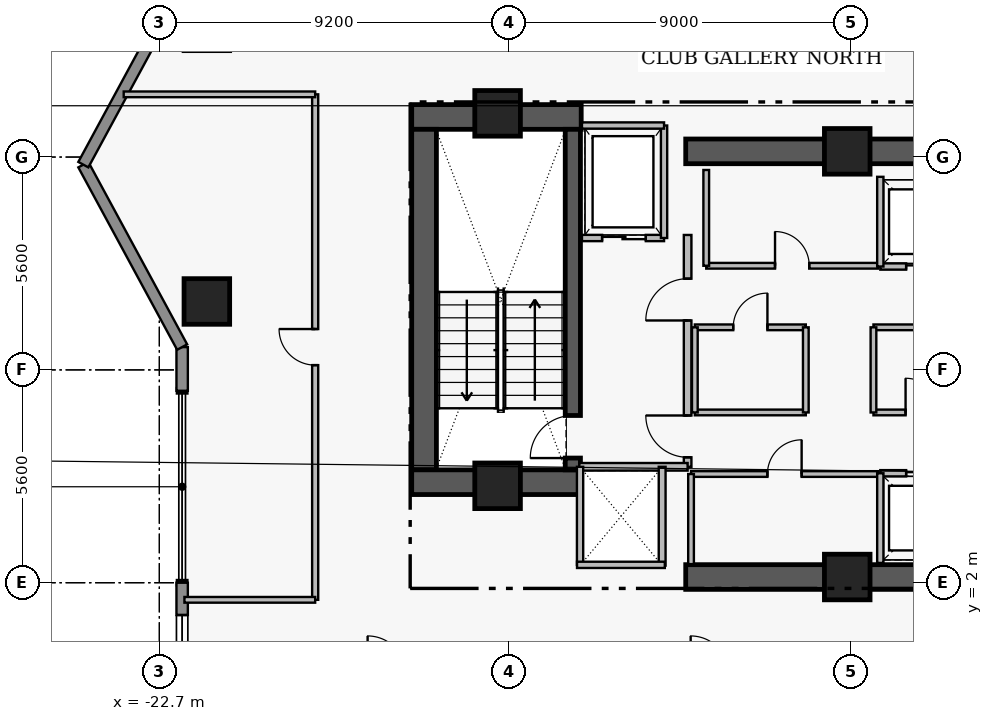
"""IFC4 building model, lengths in metres.
Left out: names, types, materials, properties, quantities, classifications, styles, units other than length and angle.
Written with IfcOpenShell. Run it as: python <this file> out.ifc"""

import sys

from ifc_helpers import new_model, si_unit, direction, frame, frame_2d, origin, origin_2d, place, context, subcontext, project, spatial, rectangle, extrude, element, fill, save


model = new_model("IFC4")
c1 = context("Model", 3, precision=1e-05, world=origin(), true_north=direction((0.0, 1.0)))
c2 = subcontext(c1, "Body", "Model", "MODEL_VIEW")
j1 = project(units=[si_unit("LENGTHUNIT", "METRE"), si_unit("PLANEANGLEUNIT", "RADIAN")], contexts=[c1])
p1 = place(None, origin())
s1 = spatial("IfcSite", under=j1, at=p1, CompositionType="ELEMENT")
p2 = place(p1, origin())
s2 = spatial("IfcBuilding", under=s1, at=p2, CompositionType="ELEMENT")
p3 = place(p2, frame((0.0, 0.0, 181.15)))
s3 = spatial("IfcBuildingStorey", under=s2, at=p3, CompositionType="ELEMENT", Elevation=181.15)
p4 = place(p3, frame((-16.06, 14.255, 0.0), z_axis=(0.0, 0.0, 1.0), x_axis=(1.0, 0.0, 0.0)))
e1 = element("IfcWall", 1, at=p4, inside=s3, PredefinedType="SHEAR", context=c2, shape_type="SweptSolid", body=[
    extrude(rectangle(XDim=4.46, YDim=0.65, at=frame_2d((2.23, 0.0))), origin(), (0.0, 0.0, 1.0), 3.56),
])
p5 = place(p3, frame((-15.735, 4.97, 0.0), z_axis=(0.0, 0.0, 1.0), x_axis=(0.0, 1.0, 0.0)))
e2 = element("IfcWall", 2, at=p5, inside=s3, PredefinedType="SHEAR", context=c2, shape_type="SweptSolid", body=[
    extrude(rectangle(XDim=8.96, YDim=0.65, at=frame_2d((4.48, 0.0))), origin(), (0.0, 0.0, 1.0), 3.56),
])
p6 = place(p3, frame((-16.06, 4.645, 0.0), z_axis=(0.0, 0.0, 1.0), x_axis=(1.0, 0.0, 0.0)))
e3 = element("IfcWall", 3, at=p6, inside=s3, PredefinedType="SHEAR", context=c2, shape_type="SweptSolid", body=[
    extrude(rectangle(XDim=4.46, YDim=0.65, at=frame_2d((2.23, 0.0))), origin(), (0.0, 0.0, 1.0), 3.56),
])
for number, where, z_axis, x_axis in (
    (4, (-8.85, 2.15, 0.0), (0.0, 0.0, 1.0), (1.0, 0.0, 0.0)),
    (5, (-8.85, 13.35, 0.0), (0.0, 0.0, 1.0), (1.0, 0.0, 0.0)),
):
    element("IfcWall", number, at=place(p3, frame(where, z_axis=z_axis, x_axis=x_axis)), inside=s3, PredefinedType="SHEAR", context=c2, shape_type="SweptSolid", body=[
        extrude(rectangle(XDim=7.6, YDim=0.65, at=frame_2d((3.8, 0.0))), origin(), (0.0, 0.0, 1.0), 3.53),
    ])
p7 = place(p3, frame((-11.82, 4.97, 0.0), z_axis=(0.0, 0.0, 1.0), x_axis=(0.0, 1.0, 0.0)))
e6 = element("IfcWall", 6, at=p7, inside=s3, PredefinedType="SHEAR", context=c2, shape_type="SweptSolid", body=[
    extrude(rectangle(XDim=8.96, YDim=0.4, at=frame_2d((4.48, 0.0))), origin(), (0.0, 0.0, 1.0), 3.56),
])
p8 = place(p7, frame((0.31, 0.0, 0.0)))
e7 = element("IfcOpeningElement", 7, at=p8, cuts=e6, PredefinedType="OPENING", context=c2, shape_type="SweptSolid", body=[
    extrude(rectangle(XDim=1.12, YDim=2.22, at=frame_2d((0.56, 1.11))), frame((0.0, 0.21, 0.0), z_axis=(0.0, -1.0, 0.0), x_axis=(1.0, 0.0, 0.0)), (0.0, 0.0, 1.0), 0.42),
])
for number, where, z_axis, x_axis in (
    (8, (-13.8, 14.35, 0.0), (0.0, 0.0, 1.0), (1.0, 0.0, 0.0)),
    (9, (-4.6, 13.35, 0.0), (0.0, 0.0, 1.0), (1.0, 0.0, 0.0)),
    (10, (-13.8, 4.55, 0.0), (0.0, 0.0, 1.0), (1.0, 0.0, 0.0)),
    (11, (-4.6, 2.15, 0.0), (0.0, 0.0, 1.0), (1.0, 0.0, 0.0)),
    (12, (-21.45, 9.4, 0.0), (0.0, 0.0, 1.0), (1.0, 0.0, 0.0)),
):
    element("IfcColumn", number, at=place(p3, frame(where, z_axis=z_axis, x_axis=x_axis)), inside=s3, PredefinedType="COLUMN", context=c2, shape_type="SweptSolid", body=[
        extrude(rectangle(XDim=1.2, YDim=1.2, at=origin_2d()), origin(), (0.0, 0.0, 1.0), 3.75),
    ])
p9 = place(p3, frame((-22.1, -4.2, 0.0), z_axis=(0.0, 0.0, 1.0), x_axis=(0.0, 1.0, 0.0)))
e13 = element("IfcWall", 13, at=p9, inside=s3, PredefinedType="STANDARD", context=c2, shape_type="SweptSolid", body=[
    extrude(rectangle(XDim=6.2, YDim=0.3, at=frame_2d((3.1, 0.0))), origin(), (0.0, 0.0, 1.0), 3.53),
])
p10 = place(p9, frame((2.045, 0.0, 0.95)))
e14 = element("IfcOpeningElement", 14, at=p10, cuts=e13, PredefinedType="OPENING", context=c2, shape_type="SweptSolid", body=[
    extrude(rectangle(XDim=1.15, YDim=1.55, at=frame_2d((0.575, 0.775))), frame((0.0, 0.16, 0.0), z_axis=(0.0, -1.0, 0.0), x_axis=(1.0, 0.0, 0.0)), (0.0, 0.0, 1.0), 0.32),
])
p11 = place(p9, frame((4.2, 0.0, 0.95)))
e15 = element("IfcOpeningElement", 15, at=p11, cuts=e13, PredefinedType="OPENING", context=c2, shape_type="SweptSolid", body=[
    extrude(rectangle(XDim=1.15, YDim=1.55, at=frame_2d((0.575, 0.775))), frame((0.0, 0.16, 0.0), z_axis=(0.0, -1.0, 0.0), x_axis=(1.0, 0.0, 0.0)), (0.0, 0.0, 1.0), 0.32),
])
p12 = place(p3, frame((-22.1, 7.05, 0.0), z_axis=(0.0, 0.0, 1.0), x_axis=(0.0, 1.0, 0.0)))
e16 = element("IfcWall", 16, at=p12, inside=s3, PredefinedType="STANDARD", context=c2, shape_type="SweptSolid", body=[
    extrude(rectangle(XDim=1.15, YDim=0.3, at=frame_2d((0.575, 0.0))), origin(), (0.0, 0.0, 1.0), 3.53),
])
for number, where, z_axis, x_axis in (
    (17, (-22.1, 8.2, 0.0), (0.0, 0.0, 1.0), (-0.476, 0.879, 0.0)),
    (18, (-24.7, 13.0, 0.0), (0.0, 0.0, 1.0), (0.476, 0.879, 0.0)),
):
    element("IfcWall", number, at=place(p3, frame(where, z_axis=z_axis, x_axis=x_axis)), inside=s3, PredefinedType="STANDARD", context=c2, shape_type="SweptSolid", body=[
        extrude(rectangle(XDim=5.459, YDim=0.3, at=frame_2d((2.729, 0.0))), origin(), (0.0, 0.0, 1.0), 3.53),
    ])
p13 = place(p3, frame((-8.8, 5.05, 0.0), z_axis=(0.0, 0.0, 1.0), x_axis=(0.0, 1.0, 0.0)))
e19 = element("IfcWall", 19, at=p13, inside=s3, PredefinedType="PARTITIONING", context=c2, shape_type="SweptSolid", body=[
    extrude(rectangle(XDim=6.1, YDim=0.2, at=frame_2d((3.05, 0.0))), origin(), (0.0, 0.0, 1.0), 3.53),
])
p14 = place(p13, frame((0.25, 0.0, 0.0)))
e20 = element("IfcOpeningElement", 20, at=p14, cuts=e19, PredefinedType="OPENING", context=c2, shape_type="SweptSolid", body=[
    extrude(rectangle(XDim=1.1, YDim=2.2, at=frame_2d((0.55, 1.1))), frame((0.0, 0.11, 0.0), z_axis=(0.0, -1.0, 0.0), x_axis=(1.0, 0.0, 0.0)), (0.0, 0.0, 1.0), 0.22),
])
p15 = place(p13, frame((3.85, 0.0, 0.0)))
e21 = element("IfcOpeningElement", 21, at=p15, cuts=e19, PredefinedType="OPENING", context=c2, shape_type="SweptSolid", body=[
    extrude(rectangle(XDim=1.1, YDim=2.2, at=frame_2d((0.55, 1.1))), frame((0.0, 0.11, 0.0), z_axis=(0.0, -1.0, 0.0), x_axis=(1.0, 0.0, 0.0)), (0.0, 0.0, 1.0), 0.22),
])
p16 = place(p3, frame((-11.58, 11.07, 0.0), z_axis=(0.0, 0.0, 1.0), x_axis=(1.0, 0.0, 0.0)))
e22 = element("IfcWall", 22, at=p16, inside=s3, PredefinedType="PARTITIONING", context=c2, shape_type="SweptSolid", body=[
    extrude(rectangle(XDim=2.16, YDim=0.165, at=frame_2d((1.08, 0.0))), origin(), (0.0, 0.0, 1.0), 3.53),
])
p17 = place(p16, frame((0.53, 0.0, 0.0)))
e23 = element("IfcOpeningElement", 23, at=p17, cuts=e22, PredefinedType="OPENING", context=c2, shape_type="SweptSolid", body=[
    extrude(rectangle(XDim=1.15, YDim=2.25, at=frame_2d((0.575, 1.125))), frame((0.0, 0.093, 0.0), z_axis=(0.0, -1.0, 0.0), x_axis=(1.0, 0.0, 0.0)), (0.0, 0.0, 1.0), 0.185),
])
p18 = place(p3, frame((-3.73, 4.88, 0.0), z_axis=(0.0, 0.0, 1.0), x_axis=(1.0, 0.0, 0.0)))
e24 = element("IfcWall", 24, at=p18, inside=s3, PredefinedType="PARTITIONING", context=c2, shape_type="SweptSolid", body=[
    extrude(rectangle(XDim=2.46, YDim=0.165, at=frame_2d((1.23, 0.0))), origin(), (0.0, 0.0, 1.0), 3.53),
])
p19 = place(p18, frame((0.68, 0.0, 0.0)))
e25 = element("IfcOpeningElement", 25, at=p19, cuts=e24, PredefinedType="OPENING", context=c2, shape_type="SweptSolid", body=[
    extrude(rectangle(XDim=1.1, YDim=2.25, at=frame_2d((0.55, 1.125))), frame((0.0, 0.093, 0.0), z_axis=(0.0, -1.0, 0.0), x_axis=(1.0, 0.0, 0.0)), (0.0, 0.0, 1.0), 0.185),
])
p20 = place(p3, frame((-3.73, 10.32, 0.0), z_axis=(0.0, 0.0, 1.0), x_axis=(1.0, 0.0, 0.0)))
e26 = element("IfcWall", 26, at=p20, inside=s3, PredefinedType="PARTITIONING", context=c2, shape_type="SweptSolid", body=[
    extrude(rectangle(XDim=2.46, YDim=0.165, at=frame_2d((1.23, 0.0))), origin(), (0.0, 0.0, 1.0), 3.53),
])
p21 = place(p20, frame((0.68, 0.0, 0.0)))
e27 = element("IfcOpeningElement", 27, at=p21, cuts=e26, PredefinedType="OPENING", context=c2, shape_type="SweptSolid", body=[
    extrude(rectangle(XDim=1.1, YDim=2.25, at=frame_2d((0.55, 1.125))), frame((0.0, 0.093, 0.0), z_axis=(0.0, -1.0, 0.0), x_axis=(1.0, 0.0, 0.0)), (0.0, 0.0, 1.0), 0.185),
])
p22 = place(p3, frame((-8.71, 4.86, 0.0), z_axis=(0.0, 0.0, 1.0), x_axis=(1.0, 0.0, 0.0)))
e28 = element("IfcWall", 28, at=p22, inside=s3, PredefinedType="PARTITIONING", context=c2, shape_type="SweptSolid", body=[
    extrude(rectangle(XDim=4.92, YDim=0.15, at=frame_2d((2.46, 0.0))), origin(), (0.0, 0.0, 1.0), 3.53),
])
p23 = place(p22, frame((2.01, 0.0, 0.0)))
e29 = element("IfcOpeningElement", 29, at=p23, cuts=e28, PredefinedType="OPENING", context=c2, shape_type="SweptSolid", body=[
    extrude(rectangle(XDim=0.9, YDim=2.15, at=frame_2d((0.45, 1.075))), frame((0.0, 0.085, 0.0), z_axis=(0.0, -1.0, 0.0), x_axis=(1.0, 0.0, 0.0)), (0.0, 0.0, 1.0), 0.17),
])
p24 = place(p3, frame((-8.31, 10.34, 0.0), z_axis=(0.0, 0.0, 1.0), x_axis=(1.0, 0.0, 0.0)))
e30 = element("IfcWall", 30, at=p24, inside=s3, PredefinedType="PARTITIONING", context=c2, shape_type="SweptSolid", body=[
    extrude(rectangle(XDim=4.52, YDim=0.15, at=frame_2d((2.26, 0.0))), origin(), (0.0, 0.0, 1.0), 3.53),
])
p25 = place(p24, frame((1.81, 0.0, 0.0)))
e31 = element("IfcOpeningElement", 31, at=p25, cuts=e30, PredefinedType="OPENING", context=c2, shape_type="SweptSolid", body=[
    extrude(rectangle(XDim=0.9, YDim=2.15, at=frame_2d((0.45, 1.075))), frame((0.0, 0.085, 0.0), z_axis=(0.0, -1.0, 0.0), x_axis=(1.0, 0.0, 0.0)), (0.0, 0.0, 1.0), 0.17),
])
p26 = place(p3, frame((-8.61, 8.72, 0.0), z_axis=(0.0, 0.0, 1.0), x_axis=(1.0, 0.0, 0.0)))
e32 = element("IfcWall", 32, at=p26, inside=s3, PredefinedType="PARTITIONING", context=c2, shape_type="SweptSolid", body=[
    extrude(rectangle(XDim=2.92, YDim=0.15, at=frame_2d((1.46, 0.0))), origin(), (0.0, 0.0, 1.0), 3.53),
])
p27 = place(p26, frame((1.01, 0.0, 0.0)))
e33 = element("IfcOpeningElement", 33, at=p27, cuts=e32, PredefinedType="OPENING", context=c2, shape_type="SweptSolid", body=[
    extrude(rectangle(XDim=0.9, YDim=2.15, at=frame_2d((0.45, 1.075))), frame((0.0, 0.085, 0.0), z_axis=(0.0, -1.0, 0.0), x_axis=(1.0, 0.0, 0.0)), (0.0, 0.0, 1.0), 0.17),
])
p28 = place(p3, frame((-3.91, 6.48, 0.0), z_axis=(0.0, 0.0, 1.0), x_axis=(1.0, 0.0, 0.0)))
e34 = element("IfcWall", 34, at=p28, inside=s3, PredefinedType="PARTITIONING", context=c2, shape_type="SweptSolid", body=[
    extrude(rectangle(XDim=2.59, YDim=0.15, at=frame_2d((1.295, 0.0))), origin(), (0.0, 0.0, 1.0), 3.53),
])
p29 = place(p28, frame((0.845, 0.0, 0.0)))
e35 = element("IfcOpeningElement", 35, at=p29, cuts=e34, PredefinedType="OPENING", context=c2, shape_type="SweptSolid", body=[
    extrude(rectangle(XDim=0.9, YDim=2.15, at=frame_2d((0.45, 1.075))), frame((0.0, 0.085, 0.0), z_axis=(0.0, -1.0, 0.0), x_axis=(1.0, 0.0, 0.0)), (0.0, 0.0, 1.0), 0.17),
])
p30 = place(p3, frame((-18.6, 1.55, 0.0), z_axis=(0.0, 0.0, 1.0), x_axis=(0.0, 1.0, 0.0)))
e36 = element("IfcWall", 36, at=p30, inside=s3, PredefinedType="PARTITIONING", context=c2, shape_type="SweptSolid", body=[
    extrude(rectangle(XDim=13.3, YDim=0.16, at=frame_2d((6.65, 0.0))), origin(), (0.0, 0.0, 1.0), 3.53),
])
p31 = place(p30, frame((6.175, 0.0, 0.0)))
e37 = element("IfcOpeningElement", 37, at=p31, cuts=e36, PredefinedType="OPENING", context=c2, shape_type="SweptSolid", body=[
    extrude(rectangle(XDim=0.95, YDim=2.15, at=frame_2d((0.475, 1.075))), frame((0.0, 0.09, 0.0), z_axis=(0.0, -1.0, 0.0), x_axis=(1.0, 0.0, 0.0)), (0.0, 0.0, 1.0), 0.18),
])
p32 = place(p3, frame((-11.65, 5.05, 0.0), z_axis=(0.0, 0.0, 1.0), x_axis=(1.0, 0.0, 0.0)))
e38 = element("IfcWall", 38, at=p32, inside=s3, PredefinedType="PARTITIONING", context=c2, shape_type="SweptSolid", body=[
    extrude(rectangle(XDim=2.85, YDim=0.2, at=frame_2d((1.425, 0.0))), origin(), (0.0, 0.0, 1.0), 3.53),
])
p33 = place(p3, frame((-9.42, 11.07, 0.0), z_axis=(0.0, 0.0, 1.0), x_axis=(0.0, 1.0, 0.0)))
e39 = element("IfcWall", 39, at=p33, inside=s3, PredefinedType="PARTITIONING", context=c2, shape_type="SweptSolid", body=[
    extrude(rectangle(XDim=2.96, YDim=0.165, at=frame_2d((1.48, 0.0))), origin(), (0.0, 0.0, 1.0), 3.53),
])
p34 = place(p3, frame((-11.58, 14.03, 0.0), z_axis=(0.0, 0.0, 1.0), x_axis=(1.0, 0.0, 0.0)))
e40 = element("IfcWall", 40, at=p34, inside=s3, PredefinedType="PARTITIONING", context=c2, shape_type="SweptSolid", body=[
    extrude(rectangle(XDim=2.16, YDim=0.165, at=frame_2d((1.08, 0.0))), origin(), (0.0, 0.0, 1.0), 3.53),
])
for number, where, z_axis, x_axis in (
    (41, (-3.73, 2.52, 0.0), (0.0, 0.0, 1.0), (0.0, 1.0, 0.0)),
    (42, (-3.73, 10.32, 0.0), (0.0, 0.0, 1.0), (0.0, 1.0, 0.0)),
):
    element("IfcWall", number, at=place(p3, frame(where, z_axis=z_axis, x_axis=x_axis)), inside=s3, PredefinedType="PARTITIONING", context=c2, shape_type="SweptSolid", body=[
        extrude(rectangle(XDim=2.36, YDim=0.165, at=frame_2d((1.18, 0.0))), origin(), (0.0, 0.0, 1.0), 3.53),
    ])
p35 = place(p3, frame((-8.71, 2.49, 0.0), z_axis=(0.0, 0.0, 1.0), x_axis=(0.0, 1.0, 0.0)))
e43 = element("IfcWall", 43, at=p35, inside=s3, PredefinedType="PARTITIONING", context=c2, shape_type="SweptSolid", body=[
    extrude(rectangle(XDim=2.37, YDim=0.15, at=frame_2d((1.185, 0.0))), origin(), (0.0, 0.0, 1.0), 3.53),
])
p36 = place(p3, frame((-8.31, 10.34, 0.0), z_axis=(0.0, 0.0, 1.0), x_axis=(0.0, 1.0, 0.0)))
e44 = element("IfcWall", 44, at=p36, inside=s3, PredefinedType="PARTITIONING", context=c2, shape_type="SweptSolid", body=[
    extrude(rectangle(XDim=2.52, YDim=0.15, at=frame_2d((1.26, 0.0))), origin(), (0.0, 0.0, 1.0), 3.53),
])
p37 = place(p3, frame((-9.47, 2.45, 0.0), z_axis=(0.0, 0.0, 1.0), x_axis=(0.0, 1.0, 0.0)))
e45 = element("IfcWall", 45, at=p37, inside=s3, PredefinedType="PARTITIONING", context=c2, shape_type="SweptSolid", body=[
    extrude(rectangle(XDim=2.6, YDim=0.18, at=frame_2d((1.3, 0.0))), origin(), (0.0, 0.0, 1.0), 3.53),
])
p38 = place(p3, frame((-11.63, 2.47, 0.0), z_axis=(0.0, 0.0, 1.0), x_axis=(0.0, 1.0, 0.0)))
e46 = element("IfcWall", 46, at=p38, inside=s3, PredefinedType="PARTITIONING", context=c2, shape_type="SweptSolid", body=[
    extrude(rectangle(XDim=2.58, YDim=0.165, at=frame_2d((1.29, 0.0))), origin(), (0.0, 0.0, 1.0), 3.53),
])
p39 = place(p3, frame((-11.71, 2.47, 0.0), z_axis=(0.0, 0.0, 1.0), x_axis=(1.0, 0.0, 0.0)))
e47 = element("IfcWall", 47, at=p39, inside=s3, PredefinedType="PARTITIONING", context=c2, shape_type="SweptSolid", body=[
    extrude(rectangle(XDim=2.31, YDim=0.165, at=frame_2d((1.155, 0.0))), origin(), (0.0, 0.0, 1.0), 2.43),
])
p40 = place(p3, frame((-8.61, 6.48, 0.0), z_axis=(0.0, 0.0, 1.0), x_axis=(1.0, 0.0, 0.0)))
e48 = element("IfcWall", 48, at=p40, inside=s3, PredefinedType="PARTITIONING", context=c2, shape_type="SweptSolid", body=[
    extrude(rectangle(XDim=2.92, YDim=0.15, at=frame_2d((1.46, 0.0))), origin(), (0.0, 0.0, 1.0), 3.53),
])
for number, where, z_axis, x_axis in (
    (49, (-8.61, 6.48, 0.0), (0.0, 0.0, 1.0), (0.0, 1.0, 0.0)),
    (50, (-5.69, 6.48, 0.0), (0.0, 0.0, 1.0), (0.0, 1.0, 0.0)),
):
    element("IfcWall", number, at=place(p3, frame(where, z_axis=z_axis, x_axis=x_axis)), inside=s3, PredefinedType="PARTITIONING", context=c2, shape_type="SweptSolid", body=[
        extrude(rectangle(XDim=2.24, YDim=0.15, at=frame_2d((1.12, 0.0))), origin(), (0.0, 0.0, 1.0), 3.53),
    ])
p41 = place(p3, frame((-3.91, 8.72, 0.0), z_axis=(0.0, 0.0, 1.0), x_axis=(1.0, 0.0, 0.0)))
e51 = element("IfcWall", 51, at=p41, inside=s3, PredefinedType="PARTITIONING", context=c2, shape_type="SweptSolid", body=[
    extrude(rectangle(XDim=2.59, YDim=0.15, at=frame_2d((1.295, 0.0))), origin(), (0.0, 0.0, 1.0), 3.53),
])
p42 = place(p3, frame((-3.91, 6.48, 0.0), z_axis=(0.0, 0.0, 1.0), x_axis=(0.0, 1.0, 0.0)))
e52 = element("IfcWall", 52, at=p42, inside=s3, PredefinedType="PARTITIONING", context=c2, shape_type="SweptSolid", body=[
    extrude(rectangle(XDim=2.24, YDim=0.15, at=frame_2d((1.12, 0.0))), origin(), (0.0, 0.0, 1.0), 3.53),
])
p43 = place(p3, frame((-22.04, 1.55, 0.0), z_axis=(0.0, 0.0, 1.0), x_axis=(1.0, 0.0, 0.0)))
e53 = element("IfcWall", 53, at=p43, inside=s3, PredefinedType="PARTITIONING", context=c2, shape_type="SweptSolid", body=[
    extrude(rectangle(XDim=3.44, YDim=0.15, at=frame_2d((1.72, 0.0))), origin(), (0.0, 0.0, 1.0), 3.53),
])
p44 = place(p3, frame((-23.638, 14.85, 0.0), z_axis=(0.0, 0.0, 1.0), x_axis=(1.0, 0.0, 0.0)))
e54 = element("IfcWall", 54, at=p44, inside=s3, PredefinedType="PARTITIONING", context=c2, shape_type="SweptSolid", body=[
    extrude(rectangle(XDim=5.038, YDim=0.15, at=frame_2d((2.519, 0.0))), origin(), (0.0, 0.0, 1.0), 3.53),
])
p45 = place(p11, origin())
e55 = element("IfcWindow", 55, at=p45, inside=s3, PartitioningType="SINGLE_PANEL", PredefinedType="WINDOW", context=c2, shape_type="SweptSolid", body=[
    extrude(rectangle(XDim=1.15, YDim=1.55, at=frame_2d((0.575, 0.775))), frame((0.0, 0.03, 0.0), z_axis=(0.0, -1.0, 0.0), x_axis=(1.0, 0.0, 0.0)), (0.0, 0.0, 1.0), 0.06),
])
fill(e15, e55)
p46 = place(p8, origin())
e56 = element("IfcDoor", 56, at=p46, inside=s3, OperationType="SINGLE_SWING_LEFT", PredefinedType="DOOR", context=c2, shape_type="SweptSolid", body=[
    extrude(rectangle(XDim=1.12, YDim=2.22, at=frame_2d((0.56, 1.11))), frame((0.0, 0.025, 0.0), z_axis=(0.0, -1.0, 0.0), x_axis=(1.0, 0.0, 0.0)), (0.0, 0.0, 1.0), 0.05),
])
fill(e7, e56)
p47 = place(p14, origin())
e57 = element("IfcDoor", 57, at=p47, inside=s3, OperationType="SINGLE_SWING_RIGHT", PredefinedType="DOOR", context=c2, shape_type="SweptSolid", body=[
    extrude(rectangle(XDim=1.1, YDim=2.2, at=frame_2d((0.55, 1.1))), frame((0.0, 0.025, 0.0), z_axis=(0.0, -1.0, 0.0), x_axis=(1.0, 0.0, 0.0)), (0.0, 0.0, 1.0), 0.05),
])
fill(e20, e57)
p48 = place(p15, origin())
e58 = element("IfcDoor", 58, at=p48, inside=s3, OperationType="SINGLE_SWING_LEFT", PredefinedType="DOOR", context=c2, shape_type="SweptSolid", body=[
    extrude(rectangle(XDim=1.1, YDim=2.2, at=frame_2d((0.55, 1.1))), frame((0.0, 0.025, 0.0), z_axis=(0.0, -1.0, 0.0), x_axis=(1.0, 0.0, 0.0)), (0.0, 0.0, 1.0), 0.05),
])
fill(e21, e58)
p49 = place(p17, origin())
e59 = element("IfcDoor", 59, at=p49, inside=s3, OperationType="SLIDING_TO_LEFT", PredefinedType="DOOR", context=c2, shape_type="SweptSolid", body=[
    extrude(rectangle(XDim=1.15, YDim=2.25, at=frame_2d((0.575, 1.125))), frame((0.0, 0.025, 0.0), z_axis=(0.0, -1.0, 0.0), x_axis=(1.0, 0.0, 0.0)), (0.0, 0.0, 1.0), 0.05),
])
fill(e23, e59)
p50 = place(p19, origin())
e60 = element("IfcDoor", 60, at=p50, inside=s3, OperationType="SLIDING_TO_LEFT", PredefinedType="DOOR", context=c2, shape_type="SweptSolid", body=[
    extrude(rectangle(XDim=1.1, YDim=2.25, at=frame_2d((0.55, 1.125))), frame((0.0, 0.025, 0.0), z_axis=(0.0, -1.0, 0.0), x_axis=(1.0, 0.0, 0.0)), (0.0, 0.0, 1.0), 0.05),
])
fill(e25, e60)
p51 = place(p21, origin())
e61 = element("IfcDoor", 61, at=p51, inside=s3, OperationType="SLIDING_TO_LEFT", PredefinedType="DOOR", context=c2, shape_type="SweptSolid", body=[
    extrude(rectangle(XDim=1.1, YDim=2.25, at=frame_2d((0.55, 1.125))), frame((0.0, 0.025, 0.0), z_axis=(0.0, -1.0, 0.0), x_axis=(1.0, 0.0, 0.0)), (0.0, 0.0, 1.0), 0.05),
])
fill(e27, e61)
p52 = place(p23, origin())
e62 = element("IfcDoor", 62, at=p52, inside=s3, OperationType="SINGLE_SWING_RIGHT", PredefinedType="DOOR", context=c2, shape_type="SweptSolid", body=[
    extrude(rectangle(XDim=0.9, YDim=2.15, at=frame_2d((0.45, 1.075))), frame((0.0, 0.025, 0.0), z_axis=(0.0, -1.0, 0.0), x_axis=(1.0, 0.0, 0.0)), (0.0, 0.0, 1.0), 0.05),
])
fill(e29, e62)
p53 = place(p25, origin())
e63 = element("IfcDoor", 63, at=p53, inside=s3, OperationType="SINGLE_SWING_LEFT", PredefinedType="DOOR", context=c2, shape_type="SweptSolid", body=[
    extrude(rectangle(XDim=0.9, YDim=2.15, at=frame_2d((0.45, 1.075))), frame((0.0, 0.025, 0.0), z_axis=(0.0, -1.0, 0.0), x_axis=(1.0, 0.0, 0.0)), (0.0, 0.0, 1.0), 0.05),
])
fill(e31, e63)
p54 = place(p27, origin())
e64 = element("IfcDoor", 64, at=p54, inside=s3, OperationType="SINGLE_SWING_RIGHT", PredefinedType="DOOR", context=c2, shape_type="SweptSolid", body=[
    extrude(rectangle(XDim=0.9, YDim=2.15, at=frame_2d((0.45, 1.075))), frame((0.0, 0.025, 0.0), z_axis=(0.0, -1.0, 0.0), x_axis=(1.0, 0.0, 0.0)), (0.0, 0.0, 1.0), 0.05),
])
fill(e33, e64)
p55 = place(p29, origin())
e65 = element("IfcDoor", 65, at=p55, inside=s3, OperationType="SINGLE_SWING_LEFT", PredefinedType="DOOR", context=c2, shape_type="SweptSolid", body=[
    extrude(rectangle(XDim=0.9, YDim=2.15, at=frame_2d((0.45, 1.075))), frame((0.0, 0.025, 0.0), z_axis=(0.0, -1.0, 0.0), x_axis=(1.0, 0.0, 0.0)), (0.0, 0.0, 1.0), 0.05),
])
fill(e35, e65)
p56 = place(p31, origin())
e66 = element("IfcDoor", 66, at=p56, inside=s3, OperationType="SINGLE_SWING_RIGHT", PredefinedType="DOOR", context=c2, shape_type="SweptSolid", body=[
    extrude(rectangle(XDim=0.95, YDim=2.15, at=frame_2d((0.475, 1.075))), frame((0.0, 0.025, 0.0), z_axis=(0.0, -1.0, 0.0), x_axis=(1.0, 0.0, 0.0)), (0.0, 0.0, 1.0), 0.05),
])
fill(e37, e66)
save(model, sys.argv[1])
